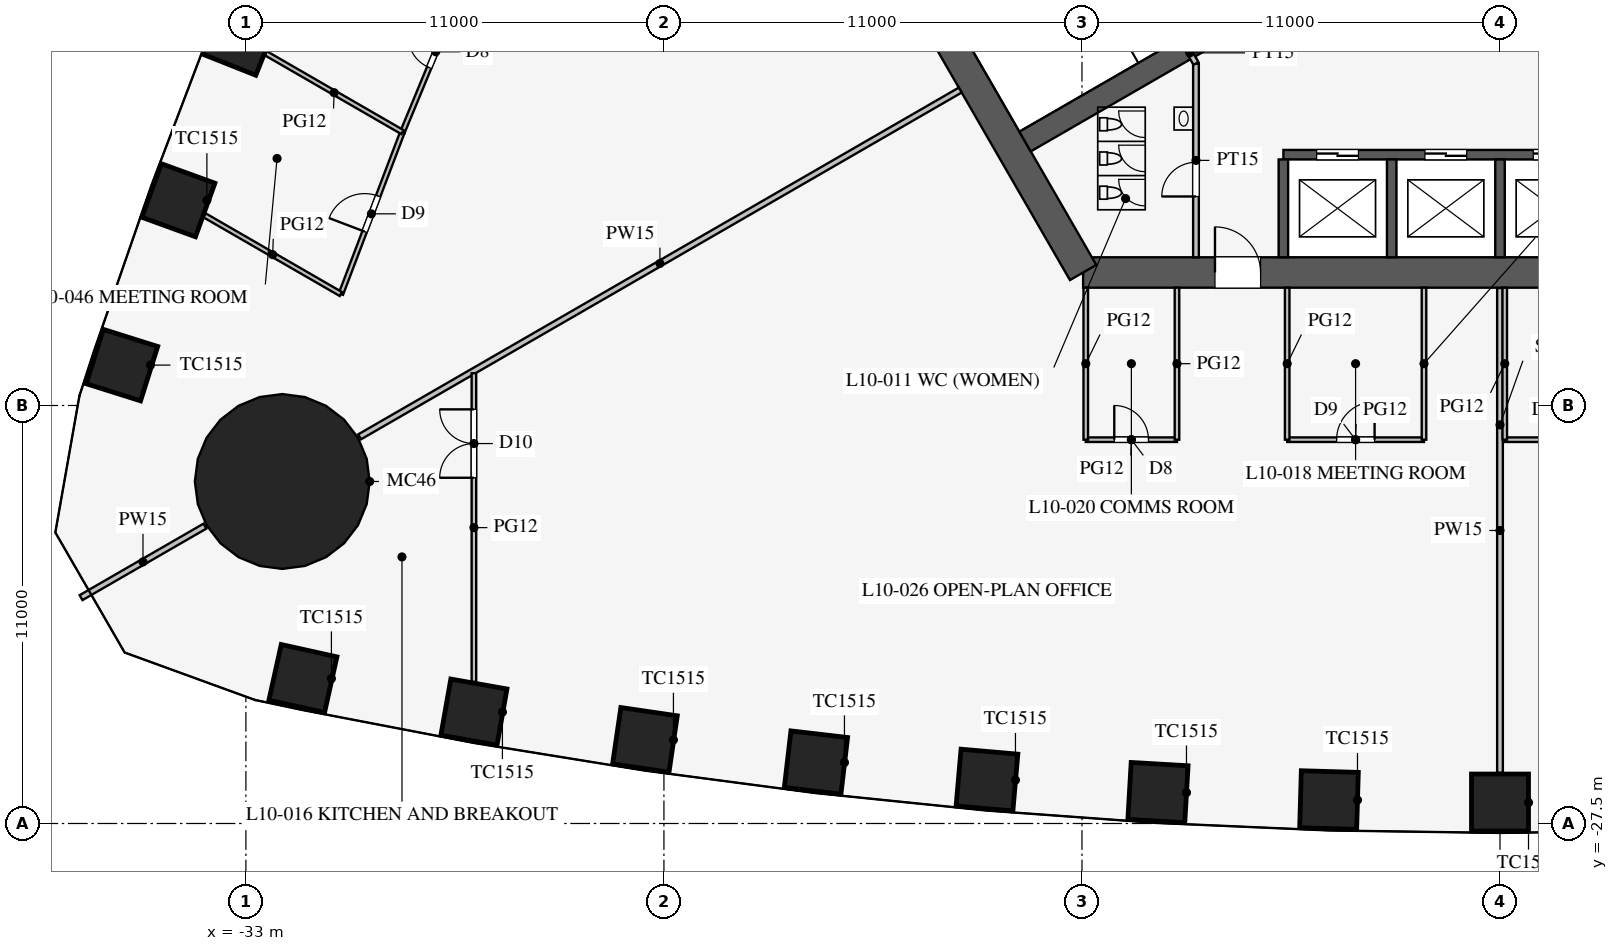
"""IFC4 building model, lengths in metres.
Left out: names, types, materials, properties, quantities, classifications, styles, units other than length and angle.
Written with IfcOpenShell. Run it as: python <this file> out.ifc"""

import sys

from ifc_helpers import new_model, si_unit, direction, frame, frame_2d, origin, origin_2d, place, context, subcontext, project, spatial, rectangle, circle, extrude, element, fill, save


model = new_model("IFC4")
c1 = context("Model", 3, precision=1e-05, world=origin(), true_north=direction((0.0, 1.0)))
c2 = subcontext(c1, "Body", "Model", "MODEL_VIEW")
j1 = project(units=[si_unit("LENGTHUNIT", "METRE"), si_unit("PLANEANGLEUNIT", "RADIAN")], contexts=[c1])
p1 = place(None, origin())
s1 = spatial("IfcSite", under=j1, at=p1, CompositionType="ELEMENT")
p2 = place(p1, origin())
s2 = spatial("IfcBuilding", under=s1, at=p2, CompositionType="ELEMENT")
p3 = place(p2, frame((0.0, 0.0, 45.9)))
s3 = spatial("IfcBuildingStorey", under=s2, at=p3, CompositionType="ELEMENT", Elevation=45.9)
for number, where, z_axis, x_axis in (
    (1, (-31.5, -23.685, 0.0), (0.0, 0.0, 1.0), (0.976, -0.217, 0.0)),
    (2, (-27.0, -24.568, 0.0), (0.0, 0.0, 1.0), (0.985, -0.174, 0.0)),
    (3, (-22.5, -25.299, 0.0), (0.0, 0.0, 1.0), (0.989, -0.145, 0.0)),
    (4, (-18.0, -25.895, 0.0), (0.0, 0.0, 1.0), (0.993, -0.116, 0.0)),
    (5, (-13.5, -26.357, 0.0), (0.0, 0.0, 1.0), (0.996, -0.087, 0.0)),
    (6, (-9.0, -26.686, 0.0), (0.0, 0.0, 1.0), (0.998, -0.058, 0.0)),
    (7, (-4.5, -26.883, 0.0), (0.0, 0.0, 1.0), (1.0, -0.029, 0.0)),
    (8, (0.0, -26.949, 0.0), (0.0, 0.0, 1.0), (1.0, 0.0, 0.0)),
    (9, (-33.16, -6.836, 0.0), (0.0, 0.0, 1.0), (-0.369, -0.929, 0.0)),
    (10, (-34.776, -11.099, 0.0), (0.0, 0.0, 1.0), (-0.342, -0.94, 0.0)),
    (11, (-36.262, -15.438, 0.0), (0.0, 0.0, 1.0), (-0.3, -0.954, 0.0)),
):
    element("IfcColumn", number, at=place(p3, frame(where, z_axis=z_axis, x_axis=x_axis)), inside=s3, PredefinedType="COLUMN", context=c2, shape_type="SweptSolid", body=[
        extrude(rectangle(XDim=1.5, YDim=1.5, at=origin_2d()), origin(), (0.0, 0.0, 1.0), 4.2),
    ])
p4 = place(p3, frame((-32.043, -18.5, 0.0), z_axis=(0.0, 0.0, 1.0), x_axis=(1.0, 0.0, 0.0)))
e12 = element("IfcColumn", 12, at=p4, inside=s3, PredefinedType="COLUMN", context=c2, shape_type="SweptSolid", body=[
    extrude(circle(Radius=2.3, at=origin_2d()), origin(), (0.0, 0.0, 1.0), 4.2),
])
p5 = place(p3, frame((-10.97, -13.0, 0.0), z_axis=(0.0, 0.0, 1.0), x_axis=(1.0, 0.0, 0.0)))
e13 = element("IfcWall", 13, at=p5, inside=s3, PredefinedType="SHEAR", context=c2, shape_type="SweptSolid", body=[
    extrude(rectangle(XDim=21.939, YDim=0.8, at=frame_2d((10.97, 0.0))), origin(), (0.0, 0.0, 1.0), 4.2),
])
p6 = place(p5, frame((17.27, 0.0, 0.0)))
e14 = element("IfcOpeningElement", 14, at=p6, cuts=e13, PredefinedType="OPENING", context=c2, shape_type="SweptSolid", body=[
    extrude(rectangle(XDim=1.2, YDim=2.1, at=frame_2d((0.6, 1.05))), frame((0.0, 0.41, 0.0), z_axis=(0.0, -1.0, 0.0), x_axis=(1.0, 0.0, 0.0)), (0.0, 0.0, 1.0), 0.82),
])
p7 = place(p5, frame((3.47, 0.0, 0.0)))
e15 = element("IfcOpeningElement", 15, at=p7, cuts=e13, PredefinedType="OPENING", context=c2, shape_type="SweptSolid", body=[
    extrude(rectangle(XDim=1.2, YDim=2.1, at=frame_2d((0.6, 1.05))), frame((0.0, 0.41, 0.0), z_axis=(0.0, -1.0, 0.0), x_axis=(1.0, 0.0, 0.0)), (0.0, 0.0, 1.0), 0.82),
])
p8 = place(p3, frame((-16.743, -3.0, 0.0), z_axis=(0.0, 0.0, 1.0), x_axis=(0.499995765644, -0.866027848477, 0.0)))
e16 = element("IfcWall", 16, at=p8, inside=s3, PredefinedType="SHEAR", context=c2, shape_type="SweptSolid", body=[
    extrude(rectangle(XDim=11.547, YDim=0.8, at=frame_2d((5.773, 0.0))), origin(), (0.0, 0.0, 1.0), 4.2),
])
p9 = place(p3, frame((-5.7, -9.9, 0.0), z_axis=(0.0, 0.0, 1.0), x_axis=(1.0, 0.0, 0.0)))
e17 = element("IfcWall", 17, at=p9, inside=s3, PredefinedType="SHEAR", context=c2, shape_type="SweptSolid", body=[
    extrude(rectangle(XDim=11.4, YDim=0.25, at=frame_2d((5.7, 0.0))), origin(), (0.0, 0.0, 1.0), 4.2),
])
p10 = place(p9, frame((0.875, 0.0, 0.0)))
e18 = element("IfcOpeningElement", 18, at=p10, cuts=e17, PredefinedType="OPENING", context=c2, shape_type="SweptSolid", body=[
    extrude(rectangle(XDim=1.1, YDim=2.2, at=frame_2d((0.55, 1.1))), frame((0.0, 0.135, 0.0), z_axis=(0.0, -1.0, 0.0), x_axis=(1.0, 0.0, 0.0)), (0.0, 0.0, 1.0), 0.27),
])
p11 = place(p9, frame((3.725, 0.0, 0.0)))
e19 = element("IfcOpeningElement", 19, at=p11, cuts=e17, PredefinedType="OPENING", context=c2, shape_type="SweptSolid", body=[
    extrude(rectangle(XDim=1.1, YDim=2.2, at=frame_2d((0.55, 1.1))), frame((0.0, 0.135, 0.0), z_axis=(0.0, -1.0, 0.0), x_axis=(1.0, 0.0, 0.0)), (0.0, 0.0, 1.0), 0.27),
])
p12 = place(p9, frame((6.575, 0.0, 0.0)))
e20 = element("IfcOpeningElement", 20, at=p12, cuts=e17, PredefinedType="OPENING", context=c2, shape_type="SweptSolid", body=[
    extrude(rectangle(XDim=1.1, YDim=2.2, at=frame_2d((0.55, 1.1))), frame((0.0, 0.135, 0.0), z_axis=(0.0, -1.0, 0.0), x_axis=(1.0, 0.0, 0.0)), (0.0, 0.0, 1.0), 0.27),
])
p13 = place(p9, frame((9.425, 0.0, 0.0)))
e21 = element("IfcOpeningElement", 21, at=p13, cuts=e17, PredefinedType="OPENING", context=c2, shape_type="SweptSolid", body=[
    extrude(rectangle(XDim=1.1, YDim=2.2, at=frame_2d((0.55, 1.1))), frame((0.0, 0.135, 0.0), z_axis=(0.0, -1.0, 0.0), x_axis=(1.0, 0.0, 0.0)), (0.0, 0.0, 1.0), 0.27),
])
for number, where, z_axis, x_axis in (
    (22, (-5.7, -10.025, 0.0), (0.0, 0.0, 1.0), (0.0, -1.0, 0.0)),
    (23, (-2.85, -10.025, 0.0), (0.0, 0.0, 1.0), (0.0, -1.0, 0.0)),
    (24, (0.0, -10.025, 0.0), (0.0, 0.0, 1.0), (0.0, -1.0, 0.0)),
):
    element("IfcWall", number, at=place(p3, frame(where, z_axis=z_axis, x_axis=x_axis)), inside=s3, PredefinedType="SHEAR", context=c2, shape_type="SweptSolid", body=[
        extrude(rectangle(XDim=2.575, YDim=0.25, at=frame_2d((1.288, 0.0))), origin(), (0.0, 0.0, 1.0), 4.2),
    ])
p14 = place(p3, frame((-4.638, -5.016, 0.0), z_axis=(0.0, 0.0, 1.0), x_axis=(-0.866019375473, -0.500010441196, 0.0)))
e25 = element("IfcWall", 25, at=p14, inside=s3, PredefinedType="SHEAR", context=c2, shape_type="SweptSolid", body=[
    extrude(rectangle(XDim=9.075, YDim=0.6, at=frame_2d((4.538, 0.0))), origin(), (0.0, 0.0, 1.0), 4.2),
])
p15 = place(p3, frame((-8.0, -7.5, 0.0), z_axis=(0.0, 0.0, 1.0), x_axis=(0.0, -1.0, 0.0)))
e26 = element("IfcWall", 26, at=p15, inside=s3, PredefinedType="PARTITIONING", context=c2, shape_type="SweptSolid", body=[
    extrude(rectangle(XDim=5.1, YDim=0.15, at=frame_2d((2.55, 0.0))), origin(), (0.0, 0.0, 1.0), 4.0),
])
p16 = place(p15, frame((2.6, 0.0, 0.0)))
e27 = element("IfcOpeningElement", 27, at=p16, cuts=e26, PredefinedType="OPENING", context=c2, shape_type="SweptSolid", body=[
    extrude(rectangle(XDim=0.9, YDim=2.1, at=frame_2d((0.45, 1.05))), frame((0.0, 0.085, 0.0), z_axis=(0.0, -1.0, 0.0), x_axis=(1.0, 0.0, 0.0)), (0.0, 0.0, 1.0), 0.17),
])
p17 = place(p3, frame((-8.0, -7.5, 0.0), z_axis=(0.0, 0.0, 1.0), x_axis=(-0.499842556608, 0.866116284689, 0.0)))
e28 = element("IfcWall", 28, at=p17, inside=s3, PredefinedType="PARTITIONING", context=c2, shape_type="SweptSolid", body=[
    extrude(rectangle(XDim=0.645, YDim=0.15, at=frame_2d((0.323, 0.0))), origin(), (0.0, 0.0, 1.0), 4.0),
])
p18 = place(p3, frame((-14.203, -8.2, 0.0), z_axis=(0.0, 0.0, 1.0), x_axis=(-0.866024965723, -0.500000758745, 0.0)))
e29 = element("IfcWall", 29, at=p18, inside=s3, PredefinedType="PARTITIONING", context=c2, shape_type="SweptSolid", body=[
    extrude(rectangle(XDim=18.25, YDim=0.15, at=frame_2d((9.125, 0.0))), origin(), (0.0, 0.0, 1.0), 2.3),
])
p19 = place(p3, frame((-34.078, -19.675, 0.0), z_axis=(0.0, 0.0, 1.0), x_axis=(-0.866019247219, -0.500010663332, 0.0)))
e30 = element("IfcWall", 30, at=p19, inside=s3, PredefinedType="PARTITIONING", context=c2, shape_type="SweptSolid", body=[
    extrude(rectangle(XDim=3.764, YDim=0.15, at=frame_2d((1.882, 0.0))), origin(), (0.0, 0.0, 1.0), 2.3),
])
p20 = place(p3, frame((0.0, -13.41, 0.0), z_axis=(0.0, 0.0, 1.0), x_axis=(0.0, -1.0, 0.0)))
e31 = element("IfcWall", 31, at=p20, inside=s3, PredefinedType="PARTITIONING", context=c2, shape_type="SweptSolid", body=[
    extrude(rectangle(XDim=12.759, YDim=0.15, at=frame_2d((6.379, 0.0))), origin(), (0.0, 0.0, 1.0), 3.2),
])
p21 = place(p3, frame((0.125, -17.4, 0.0), z_axis=(0.0, 0.0, 1.0), x_axis=(1.0, 0.0, 0.0)))
e32 = element("IfcWall", 32, at=p21, inside=s3, PredefinedType="PARTITIONING", context=c2, shape_type="SweptSolid", body=[
    extrude(rectangle(XDim=3.6, YDim=0.12, at=frame_2d((1.8, 0.0))), origin(), (0.0, 0.0, 1.0), 2.9),
])
p22 = place(p21, frame((1.3, 0.0, 0.15)))
e33 = element("IfcOpeningElement", 33, at=p22, cuts=e32, PredefinedType="OPENING", context=c2, shape_type="SweptSolid", body=[
    extrude(rectangle(XDim=1.0, YDim=2.1, at=frame_2d((0.5, 1.05))), frame((0.0, 0.07, 0.0), z_axis=(0.0, -1.0, 0.0), x_axis=(1.0, 0.0, 0.0)), (0.0, 0.0, 1.0), 0.14),
])
p23 = place(p3, frame((-10.9, -17.4, 0.0), z_axis=(0.0, 0.0, 1.0), x_axis=(1.0, 0.0, 0.0)))
e34 = element("IfcWall", 34, at=p23, inside=s3, PredefinedType="PARTITIONING", context=c2, shape_type="SweptSolid", body=[
    extrude(rectangle(XDim=2.4, YDim=0.12, at=frame_2d((1.2, 0.0))), origin(), (0.0, 0.0, 1.0), 2.9),
])
p24 = place(p23, frame((0.75, 0.0, 0.15)))
e35 = element("IfcOpeningElement", 35, at=p24, cuts=e34, PredefinedType="OPENING", context=c2, shape_type="SweptSolid", body=[
    extrude(rectangle(XDim=0.9, YDim=2.1, at=frame_2d((0.45, 1.05))), frame((0.0, 0.07, 0.0), z_axis=(0.0, -1.0, 0.0), x_axis=(1.0, 0.0, 0.0)), (0.0, 0.0, 1.0), 0.14),
])
p25 = place(p3, frame((-5.6, -17.4, 0.0), z_axis=(0.0, 0.0, 1.0), x_axis=(1.0, 0.0, 0.0)))
e36 = element("IfcWall", 36, at=p25, inside=s3, PredefinedType="PARTITIONING", context=c2, shape_type="SweptSolid", body=[
    extrude(rectangle(XDim=3.6, YDim=0.12, at=frame_2d((1.8, 0.0))), origin(), (0.0, 0.0, 1.0), 2.9),
])
p26 = place(p25, frame((1.3, 0.0, 0.15)))
e37 = element("IfcOpeningElement", 37, at=p26, cuts=e36, PredefinedType="OPENING", context=c2, shape_type="SweptSolid", body=[
    extrude(rectangle(XDim=1.0, YDim=2.1, at=frame_2d((0.5, 1.05))), frame((0.0, 0.07, 0.0), z_axis=(0.0, -1.0, 0.0), x_axis=(1.0, 0.0, 0.0)), (0.0, 0.0, 1.0), 0.14),
])
for number, where, z_axis, x_axis in (
    (38, (0.125, -13.4, 0.0), (0.0, 0.0, 1.0), (0.0, -1.0, 0.0)),
    (39, (-10.9, -13.4, 0.0), (0.0, 0.0, 1.0), (0.0, -1.0, 0.0)),
    (40, (-2.0, -13.4, 0.0), (0.0, 0.0, 1.0), (0.0, -1.0, 0.0)),
    (41, (-5.6, -13.4, 0.0), (0.0, 0.0, 1.0), (0.0, -1.0, 0.0)),
    (42, (-8.5, -13.4, 0.0), (0.0, 0.0, 1.0), (0.0, -1.0, 0.0)),
):
    element("IfcWall", number, at=place(p3, frame(where, z_axis=z_axis, x_axis=x_axis)), inside=s3, PredefinedType="PARTITIONING", context=c2, shape_type="SweptSolid", body=[
        extrude(rectangle(XDim=4.0, YDim=0.12, at=frame_2d((2.0, 0.0))), origin(), (0.0, 0.0, 1.0), 2.9),
    ])
p27 = place(p3, frame((-27.0, -15.652, 0.0), z_axis=(0.0, 0.0, 1.0), x_axis=(0.0, -1.0, 0.0)))
e43 = element("IfcWall", 43, at=p27, inside=s3, PredefinedType="PARTITIONING", context=c2, shape_type="SweptSolid", body=[
    extrude(rectangle(XDim=8.124, YDim=0.12, at=frame_2d((4.062, 0.0))), origin(), (0.0, 0.0, 1.0), 2.9),
])
p28 = place(p27, frame((0.95, 0.0, 0.15)))
e44 = element("IfcOpeningElement", 44, at=p28, cuts=e43, PredefinedType="OPENING", context=c2, shape_type="SweptSolid", body=[
    extrude(rectangle(XDim=1.8, YDim=2.1, at=frame_2d((0.9, 1.05))), frame((0.0, 0.07, 0.0), z_axis=(0.0, -1.0, 0.0), x_axis=(1.0, 0.0, 0.0)), (0.0, 0.0, 1.0), 0.14),
])
p29 = place(p3, frame((-27.144, -5.113, 0.0), z_axis=(0.0, 0.0, 1.0), x_axis=(-0.382594071331, -0.923916542001, 0.0)))
e45 = element("IfcWall", 45, at=p29, inside=s3, PredefinedType="PARTITIONING", context=c2, shape_type="SweptSolid", body=[
    extrude(rectangle(XDim=4.539, YDim=0.12, at=frame_2d((2.27, 0.0))), origin(), (0.0, 0.0, 1.0), 2.9),
])
p30 = place(p29, frame((1.8, 0.0, 0.15)))
e46 = element("IfcOpeningElement", 46, at=p30, cuts=e45, PredefinedType="OPENING", context=c2, shape_type="SweptSolid", body=[
    extrude(rectangle(XDim=0.9, YDim=2.1, at=frame_2d((0.45, 1.05))), frame((0.0, 0.07, 0.0), z_axis=(0.0, -1.0, 0.0), x_axis=(1.0, 0.0, 0.0)), (0.0, 0.0, 1.0), 0.14),
])
p31 = place(p3, frame((-28.88, -9.307, 0.0), z_axis=(0.0, 0.0, 1.0), x_axis=(-0.355416187875, -0.934708154129, 0.0)))
e47 = element("IfcWall", 47, at=p31, inside=s3, PredefinedType="PARTITIONING", context=c2, shape_type="SweptSolid", body=[
    extrude(rectangle(XDim=4.558, YDim=0.12, at=frame_2d((2.279, 0.0))), origin(), (0.0, 0.0, 1.0), 2.9),
])
p32 = place(p31, frame((1.8, 0.0, 0.15)))
e48 = element("IfcOpeningElement", 48, at=p32, cuts=e47, PredefinedType="OPENING", context=c2, shape_type="SweptSolid", body=[
    extrude(rectangle(XDim=1.0, YDim=2.1, at=frame_2d((0.5, 1.05))), frame((0.0, 0.07, 0.0), z_axis=(0.0, -1.0, 0.0), x_axis=(1.0, 0.0, 0.0)), (0.0, 0.0, 1.0), 0.14),
])
p33 = place(p3, frame((-28.88, -9.307, 0.0), z_axis=(0.0, 0.0, 1.0), x_axis=(-0.866027987673, 0.499995524547, 0.0)))
e49 = element("IfcWall", 49, at=p33, inside=s3, PredefinedType="PARTITIONING", context=c2, shape_type="SweptSolid", body=[
    extrude(rectangle(XDim=4.153, YDim=0.12, at=frame_2d((2.077, 0.0))), origin(), (0.0, 0.0, 1.0), 2.9),
])
p34 = place(p3, frame((-30.5, -13.567, 0.0), z_axis=(0.0, 0.0, 1.0), x_axis=(-0.86602376425, 0.500002839747, 0.0)))
e50 = element("IfcWall", 50, at=p34, inside=s3, PredefinedType="PARTITIONING", context=c2, shape_type="SweptSolid", body=[
    extrude(rectangle(XDim=4.146, YDim=0.12, at=frame_2d((2.073, 0.0))), origin(), (0.0, 0.0, 1.0), 2.9),
])
p35 = place(p16, frame((0.9, 0.0, 0.0), z_axis=(0.0, 0.0, 1.0), x_axis=(-1.0, 0.0, 0.0)))
e51 = element("IfcDoor", 51, at=p35, inside=s3, OperationType="SINGLE_SWING_LEFT", PredefinedType="DOOR", context=c2, shape_type="SweptSolid", body=[
    extrude(rectangle(XDim=0.9, YDim=2.1, at=frame_2d((0.45, 1.05))), frame((0.0, 0.025, 0.0), z_axis=(0.0, -1.0, 0.0), x_axis=(1.0, 0.0, 0.0)), (0.0, 0.0, 1.0), 0.05),
])
fill(e27, e51)
p36 = place(p7, origin())
e52 = element("IfcDoor", 52, at=p36, inside=s3, OperationType="SINGLE_SWING_LEFT", PredefinedType="DOOR", context=c2, shape_type="SweptSolid", body=[
    extrude(rectangle(XDim=1.2, YDim=2.1, at=frame_2d((0.6, 1.05))), frame((0.0, 0.025, 0.0), z_axis=(0.0, -1.0, 0.0), x_axis=(1.0, 0.0, 0.0)), (0.0, 0.0, 1.0), 0.05),
])
fill(e15, e52)
p37 = place(p28, frame((1.8, 0.0, 0.0), z_axis=(0.0, 0.0, 1.0), x_axis=(-1.0, 0.0, 0.0)))
e53 = element("IfcDoor", 53, at=p37, inside=s3, OperationType="DOUBLE_DOOR_SINGLE_SWING", PredefinedType="DOOR", context=c2, shape_type="SweptSolid", body=[
    extrude(rectangle(XDim=1.8, YDim=2.1, at=frame_2d((0.9, 1.05))), frame((0.0, 0.025, 0.0), z_axis=(0.0, -1.0, 0.0), x_axis=(1.0, 0.0, 0.0)), (0.0, 0.0, 1.0), 0.05),
])
fill(e44, e53)
p38 = place(p26, origin())
e54 = element("IfcDoor", 54, at=p38, inside=s3, OperationType="SINGLE_SWING_RIGHT", PredefinedType="DOOR", context=c2, shape_type="SweptSolid", body=[
    extrude(rectangle(XDim=1.0, YDim=2.1, at=frame_2d((0.5, 1.05))), frame((0.0, 0.025, 0.0), z_axis=(0.0, -1.0, 0.0), x_axis=(1.0, 0.0, 0.0)), (0.0, 0.0, 1.0), 0.05),
])
fill(e37, e54)
p39 = place(p24, origin())
e55 = element("IfcDoor", 55, at=p39, inside=s3, OperationType="SINGLE_SWING_LEFT", PredefinedType="DOOR", context=c2, shape_type="SweptSolid", body=[
    extrude(rectangle(XDim=0.9, YDim=2.1, at=frame_2d((0.45, 1.05))), frame((0.0, 0.025, 0.0), z_axis=(0.0, -1.0, 0.0), x_axis=(1.0, 0.0, 0.0)), (0.0, 0.0, 1.0), 0.05),
])
fill(e35, e55)
p40 = place(p30, frame((0.9, 0.0, 0.0), z_axis=(0.0, 0.0, 1.0), x_axis=(-1.0, 0.0, 0.0)))
e56 = element("IfcDoor", 56, at=p40, inside=s3, OperationType="SINGLE_SWING_RIGHT", PredefinedType="DOOR", context=c2, shape_type="SweptSolid", body=[
    extrude(rectangle(XDim=0.9, YDim=2.1, at=frame_2d((0.45, 1.05))), frame((0.0, 0.025, 0.0), z_axis=(0.0, -1.0, 0.0), x_axis=(1.0, 0.0, 0.0)), (0.0, 0.0, 1.0), 0.05),
])
fill(e46, e56)
p41 = place(p32, frame((1.0, 0.0, 0.0), z_axis=(0.0, 0.0, 1.0), x_axis=(-1.0, 0.0, 0.0)))
e57 = element("IfcDoor", 57, at=p41, inside=s3, OperationType="SINGLE_SWING_LEFT", PredefinedType="DOOR", context=c2, shape_type="SweptSolid", body=[
    extrude(rectangle(XDim=1.0, YDim=2.1, at=frame_2d((0.5, 1.05))), frame((0.0, 0.025, 0.0), z_axis=(0.0, -1.0, 0.0), x_axis=(1.0, 0.0, 0.0)), (0.0, 0.0, 1.0), 0.05),
])
fill(e48, e57)
p42 = place(p10, origin())
e58 = element("IfcDoor", 58, at=p42, inside=s3, OperationType="DOUBLE_DOOR_SLIDING", PredefinedType="DOOR", context=c2, shape_type="SweptSolid", body=[
    extrude(rectangle(XDim=1.1, YDim=2.2, at=frame_2d((0.55, 1.1))), frame((0.0, 0.025, 0.0), z_axis=(0.0, -1.0, 0.0), x_axis=(1.0, 0.0, 0.0)), (0.0, 0.0, 1.0), 0.05),
])
fill(e18, e58)
p43 = place(p11, origin())
e59 = element("IfcDoor", 59, at=p43, inside=s3, OperationType="DOUBLE_DOOR_SLIDING", PredefinedType="DOOR", context=c2, shape_type="SweptSolid", body=[
    extrude(rectangle(XDim=1.1, YDim=2.2, at=frame_2d((0.55, 1.1))), frame((0.0, 0.025, 0.0), z_axis=(0.0, -1.0, 0.0), x_axis=(1.0, 0.0, 0.0)), (0.0, 0.0, 1.0), 0.05),
])
fill(e19, e59)
p44 = place(p12, origin())
e60 = element("IfcDoor", 60, at=p44, inside=s3, OperationType="DOUBLE_DOOR_SLIDING", PredefinedType="DOOR", context=c2, shape_type="SweptSolid", body=[
    extrude(rectangle(XDim=1.1, YDim=2.2, at=frame_2d((0.55, 1.1))), frame((0.0, 0.025, 0.0), z_axis=(0.0, -1.0, 0.0), x_axis=(1.0, 0.0, 0.0)), (0.0, 0.0, 1.0), 0.05),
])
fill(e20, e60)
save(model, sys.argv[1])
